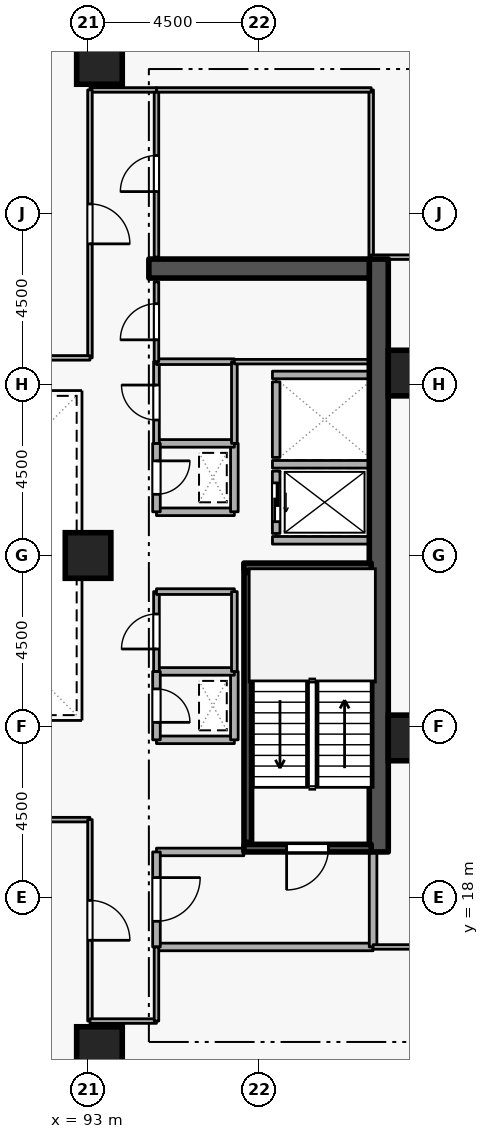
"""IFC4 building model, lengths in metres.
Left out: names, types, materials, properties, quantities, classifications, styles, units other than length and angle.
Written with IfcOpenShell. Run it as: python <this file> out.ifc"""

import sys

from ifc_helpers import new_model, si_unit, direction, frame, frame_2d, origin, origin_2d, place, context, subcontext, project, spatial, rectangle, extrude, element, fill, save


model = new_model("IFC4")
c1 = context("Model", 3, precision=1e-05, world=origin(), true_north=direction((0.0, 1.0)))
c2 = subcontext(c1, "Body", "Model", "MODEL_VIEW")
j1 = project(units=[si_unit("LENGTHUNIT", "METRE"), si_unit("PLANEANGLEUNIT", "RADIAN")], contexts=[c1])
p1 = place(None, origin())
s1 = spatial("IfcSite", under=j1, at=p1, CompositionType="ELEMENT")
p2 = place(p1, origin())
s2 = spatial("IfcBuilding", under=s1, at=p2, CompositionType="ELEMENT")
p3 = place(p2, frame((0.0, 0.0, 126.9)))
s3 = spatial("IfcBuildingStorey", under=s2, at=p3, CompositionType="ELEMENT", Elevation=126.9)
p4 = place(p3, frame((100.65, 19.2, 0.0), z_axis=(0.0, 0.0, 1.0), x_axis=(0.0, 1.0, 0.0)))
e1 = element("IfcWall", 1, at=p4, inside=s3, PredefinedType="SHEAR", context=c2, shape_type="SweptSolid", body=[
    extrude(rectangle(XDim=15.6, YDim=0.5, at=frame_2d((7.8, 0.0))), origin(), (0.0, 0.0, 1.0), 3.6),
])
p5 = place(p3, frame((94.6, 34.55, 0.0), z_axis=(0.0, 0.0, 1.0), x_axis=(1.0, 0.0, 0.0)))
e2 = element("IfcWall", 2, at=p5, inside=s3, PredefinedType="SHEAR", context=c2, shape_type="SweptSolid", body=[
    extrude(rectangle(XDim=5.8, YDim=0.5, at=frame_2d((2.9, 0.0))), origin(), (0.0, 0.0, 1.0), 3.6),
])
for number, where, z_axis, x_axis in (
    (3, (93.3, 14.0, 0.0), (0.0, 0.0, 1.0), (1.0, 0.0, 0.0)),
    (4, (93.3, 40.0, 0.0), (0.0, 0.0, 1.0), (1.0, 0.0, 0.0)),
    (5, (101.5, 22.2, 0.0), (0.0, 0.0, 1.0), (1.0, 0.0, 0.0)),
    (6, (101.5, 31.8, 0.0), (0.0, 0.0, 1.0), (1.0, 0.0, 0.0)),
    (7, (93.0, 27.0, 0.0), (0.0, 0.0, 1.0), (1.0, 0.0, 0.0)),
):
    element("IfcColumn", number, at=place(p3, frame(where, z_axis=z_axis, x_axis=x_axis)), inside=s3, PredefinedType="COLUMN", context=c2, shape_type="SweptSolid", body=[
        extrude(rectangle(XDim=1.2, YDim=1.2, at=origin_2d()), origin(), (0.0, 0.0, 1.0), 3.6),
    ])
p6 = place(p3, frame((97.95, 29.22, 0.0), z_axis=(0.0, 0.0, 1.0), x_axis=(0.0, -1.0, 0.0)))
e8 = element("IfcWall", 8, at=p6, inside=s3, PredefinedType="STANDARD", context=c2, shape_type="SweptSolid", body=[
    extrude(rectangle(XDim=1.64, YDim=0.2, at=frame_2d((0.82, 0.0))), origin(), (0.0, 0.0, 1.0), 3.34),
])
p7 = place(p6, frame((0.31, 0.0, 0.0)))
e9 = element("IfcOpeningElement", 9, at=p7, cuts=e8, PredefinedType="OPENING", context=c2, shape_type="SweptSolid", body=[
    extrude(rectangle(XDim=1.02, YDim=2.06, at=frame_2d((0.51, 1.03))), frame((0.0, 0.11, 0.0), z_axis=(0.0, -1.0, 0.0), x_axis=(1.0, 0.0, 0.0)), (0.0, 0.0, 1.0), 0.22),
])
p8 = place(p3, frame((97.95, 31.57, 0.0), z_axis=(0.0, 0.0, 1.0), x_axis=(0.0, -1.0, 0.0)))
e10 = element("IfcWall", 10, at=p8, inside=s3, PredefinedType="STANDARD", context=c2, shape_type="SweptSolid", body=[
    extrude(rectangle(XDim=1.99, YDim=0.2, at=frame_2d((0.995, 0.0))), origin(), (0.0, 0.0, 1.0), 3.34),
])
for number, where, z_axis, x_axis in (
    (11, (97.852, 29.4, 0.0), (0.0, 0.0, 1.0), (1.0, 0.0, 0.0)),
    (12, (97.852, 27.4, 0.0), (0.0, 0.0, 1.0), (1.0, 0.0, 0.0)),
    (13, (97.852, 31.75, 0.0), (0.0, 0.0, 1.0), (1.0, 0.0, 0.0)),
):
    element("IfcWall", number, at=place(p3, frame(where, z_axis=z_axis, x_axis=x_axis)), inside=s3, PredefinedType="STANDARD", context=c2, shape_type="SweptSolid", body=[
        extrude(rectangle(XDim=2.536, YDim=0.2, at=frame_2d((1.268, 0.0))), origin(), (0.0, 0.0, 1.0), 3.34),
    ])
p9 = place(p3, frame((100.45, 19.3, 0.0), z_axis=(0.0, 0.0, 1.0), x_axis=(-1.0, 0.0, 0.0)))
e14 = element("IfcWall", 14, at=p9, inside=s3, PredefinedType="SHEAR", context=c2, shape_type="SweptSolid", body=[
    extrude(rectangle(XDim=3.35, YDim=0.2, at=frame_2d((1.675, 0.0))), origin(), (0.0, 0.0, 1.0), 3.6),
])
p10 = place(p9, frame((1.125, 0.0, 0.0)))
e15 = element("IfcOpeningElement", 15, at=p10, cuts=e14, PredefinedType="OPENING", context=c2, shape_type="SweptSolid", body=[
    extrude(rectangle(XDim=1.1, YDim=2.1, at=frame_2d((0.55, 1.05))), frame((0.0, 0.11, 0.0), z_axis=(0.0, -1.0, 0.0), x_axis=(1.0, 0.0, 0.0)), (0.0, 0.0, 1.0), 0.22),
])
p11 = place(p3, frame((97.1, 26.7, 0.0), z_axis=(0.0, 0.0, 1.0), x_axis=(1.0, 0.0, 0.0)))
e16 = element("IfcWall", 16, at=p11, inside=s3, PredefinedType="SHEAR", context=c2, shape_type="SweptSolid", body=[
    extrude(rectangle(XDim=3.35, YDim=0.2, at=frame_2d((1.675, 0.0))), origin(), (0.0, 0.0, 1.0), 3.6),
])
p12 = place(p3, frame((97.203, 26.55, 0.0), z_axis=(0.0, 0.0, 1.0), x_axis=(0.0, -1.0, 0.0)))
e17 = element("IfcWall", 17, at=p12, inside=s3, PredefinedType="SHEAR", context=c2, shape_type="SweptSolid", body=[
    extrude(rectangle(XDim=7.1, YDim=0.2, at=frame_2d((3.55, 0.0))), origin(), (0.0, 0.0, 1.0), 3.6),
])
p13 = place(p3, frame((94.8, 16.7, 0.0), z_axis=(0.0, 0.0, 1.0), x_axis=(1.0, 0.0, 0.0)))
e18 = element("IfcWall", 18, at=p13, inside=s3, PredefinedType="STANDARD", context=c2, shape_type="SweptSolid", body=[
    extrude(rectangle(XDim=5.7, YDim=0.2, at=frame_2d((2.85, 0.0))), origin(), (0.0, 0.0, 1.0), 3.34),
])
p14 = place(p3, frame((100.5, 16.7, 0.0), z_axis=(0.0, 0.0, 1.0), x_axis=(0.0, 1.0, 0.0)))
e19 = element("IfcWall", 19, at=p14, inside=s3, PredefinedType="STANDARD", context=c2, shape_type="SweptSolid", body=[
    extrude(rectangle(XDim=2.5, YDim=0.2, at=frame_2d((1.25, 0.0))), origin(), (0.0, 0.0, 1.0), 3.34),
])
p15 = place(p3, frame((97.1, 19.2, 0.0), z_axis=(0.0, 0.0, 1.0), x_axis=(-1.0, 0.0, 0.0)))
e20 = element("IfcWall", 20, at=p15, inside=s3, PredefinedType="STANDARD", context=c2, shape_type="SweptSolid", body=[
    extrude(rectangle(XDim=2.3, YDim=0.2, at=frame_2d((1.15, 0.0))), origin(), (0.0, 0.0, 1.0), 2.545),
])
p16 = place(p3, frame((94.8, 19.2, 0.0), z_axis=(0.0, 0.0, 1.0), x_axis=(0.0, -1.0, 0.0)))
e21 = element("IfcWall", 21, at=p16, inside=s3, PredefinedType="STANDARD", context=c2, shape_type="SweptSolid", body=[
    extrude(rectangle(XDim=2.5, YDim=0.2, at=frame_2d((1.25, 0.0))), origin(), (0.0, 0.0, 1.0), 3.34),
])
p17 = place(p16, frame((0.675, 0.0, 0.0)))
e22 = element("IfcOpeningElement", 22, at=p17, cuts=e21, PredefinedType="OPENING", context=c2, shape_type="SweptSolid", body=[
    extrude(rectangle(XDim=1.15, YDim=2.1, at=frame_2d((0.575, 1.05))), frame((0.0, 0.11, 0.0), z_axis=(0.0, -1.0, 0.0), x_axis=(1.0, 0.0, 0.0)), (0.0, 0.0, 1.0), 0.22),
])
p18 = place(p3, frame((94.8, 28.15, 0.0), z_axis=(0.0, 0.0, 1.0), x_axis=(1.0, 0.0, 0.0)))
e23 = element("IfcWall", 23, at=p18, inside=s3, PredefinedType="STANDARD", context=c2, shape_type="SweptSolid", body=[
    extrude(rectangle(XDim=2.05, YDim=0.2, at=frame_2d((1.025, 0.0))), origin(), (0.0, 0.0, 1.0), 3.34),
])
p19 = place(p3, frame((96.85, 28.15, 0.0), z_axis=(0.0, 0.0, 1.0), x_axis=(0.0, 1.0, 0.0)))
e24 = element("IfcWall", 24, at=p19, inside=s3, PredefinedType="STANDARD", context=c2, shape_type="SweptSolid", body=[
    extrude(rectangle(XDim=1.8, YDim=0.2, at=frame_2d((0.9, 0.0))), origin(), (0.0, 0.0, 1.0), 3.34),
])
p20 = place(p3, frame((96.85, 29.95, 0.0), z_axis=(0.0, 0.0, 1.0), x_axis=(-1.0, 0.0, 0.0)))
e25 = element("IfcWall", 25, at=p20, inside=s3, PredefinedType="STANDARD", context=c2, shape_type="SweptSolid", body=[
    extrude(rectangle(XDim=2.05, YDim=0.2, at=frame_2d((1.025, 0.0))), origin(), (0.0, 0.0, 1.0), 3.34),
])
p21 = place(p3, frame((94.8, 29.95, 0.0), z_axis=(0.0, 0.0, 1.0), x_axis=(0.0, -1.0, 0.0)))
e26 = element("IfcWall", 26, at=p21, inside=s3, PredefinedType="STANDARD", context=c2, shape_type="SweptSolid", body=[
    extrude(rectangle(XDim=1.8, YDim=0.2, at=frame_2d((0.9, 0.0))), origin(), (0.0, 0.0, 1.0), 3.34),
])
p22 = place(p21, frame((0.46, 0.0, 0.0)))
e27 = element("IfcOpeningElement", 27, at=p22, cuts=e26, PredefinedType="OPENING", context=c2, shape_type="SweptSolid", body=[
    extrude(rectangle(XDim=0.88, YDim=2.04, at=frame_2d((0.44, 1.02))), frame((0.0, 0.11, 0.0), z_axis=(0.0, -1.0, 0.0), x_axis=(1.0, 0.0, 0.0)), (0.0, 0.0, 1.0), 0.22),
])
p23 = place(p3, frame((94.8, 22.15, 0.0), z_axis=(0.0, 0.0, 1.0), x_axis=(1.0, 0.0, 0.0)))
e28 = element("IfcWall", 28, at=p23, inside=s3, PredefinedType="STANDARD", context=c2, shape_type="SweptSolid", body=[
    extrude(rectangle(XDim=2.05, YDim=0.2, at=frame_2d((1.025, 0.0))), origin(), (0.0, 0.0, 1.0), 3.34),
])
p24 = place(p3, frame((96.85, 22.15, 0.0), z_axis=(0.0, 0.0, 1.0), x_axis=(0.0, 1.0, 0.0)))
e29 = element("IfcWall", 29, at=p24, inside=s3, PredefinedType="STANDARD", context=c2, shape_type="SweptSolid", body=[
    extrude(rectangle(XDim=1.8, YDim=0.2, at=frame_2d((0.9, 0.0))), origin(), (0.0, 0.0, 1.0), 3.34),
])
p25 = place(p3, frame((96.85, 23.95, 0.0), z_axis=(0.0, 0.0, 1.0), x_axis=(-1.0, 0.0, 0.0)))
e30 = element("IfcWall", 30, at=p25, inside=s3, PredefinedType="STANDARD", context=c2, shape_type="SweptSolid", body=[
    extrude(rectangle(XDim=2.05, YDim=0.2, at=frame_2d((1.025, 0.0))), origin(), (0.0, 0.0, 1.0), 3.34),
])
p26 = place(p3, frame((94.8, 23.95, 0.0), z_axis=(0.0, 0.0, 1.0), x_axis=(0.0, -1.0, 0.0)))
e31 = element("IfcWall", 31, at=p26, inside=s3, PredefinedType="STANDARD", context=c2, shape_type="SweptSolid", body=[
    extrude(rectangle(XDim=1.8, YDim=0.2, at=frame_2d((0.9, 0.0))), origin(), (0.0, 0.0, 1.0), 3.34),
])
p27 = place(p26, frame((0.46, 0.0, 0.0)))
e32 = element("IfcOpeningElement", 32, at=p27, cuts=e31, PredefinedType="OPENING", context=c2, shape_type="SweptSolid", body=[
    extrude(rectangle(XDim=0.88, YDim=2.04, at=frame_2d((0.44, 1.02))), frame((0.0, 0.11, 0.0), z_axis=(0.0, -1.0, 0.0), x_axis=(1.0, 0.0, 0.0)), (0.0, 0.0, 1.0), 0.22),
])
p28 = place(p3, frame((94.8, 23.95, 0.0), z_axis=(0.0, 0.0, 1.0), x_axis=(0.0, 1.0, 0.0)))
e33 = element("IfcWall", 33, at=p28, inside=s3, PredefinedType="PARTITIONING", context=c2, shape_type="SweptSolid", body=[
    extrude(rectangle(XDim=2.1, YDim=0.15, at=frame_2d((1.05, 0.0))), origin(), (0.0, 0.0, 1.0), 3.34),
])
p29 = place(p28, frame((0.59, 0.0, 0.0)))
e34 = element("IfcOpeningElement", 34, at=p29, cuts=e33, PredefinedType="OPENING", context=c2, shape_type="SweptSolid", body=[
    extrude(rectangle(XDim=0.92, YDim=2.08, at=frame_2d((0.46, 1.04))), frame((0.0, 0.085, 0.0), z_axis=(0.0, -1.0, 0.0), x_axis=(1.0, 0.0, 0.0)), (0.0, 0.0, 1.0), 0.17),
])
p30 = place(p3, frame((94.8, 26.05, 0.0), z_axis=(0.0, 0.0, 1.0), x_axis=(1.0, 0.0, 0.0)))
e35 = element("IfcWall", 35, at=p30, inside=s3, PredefinedType="PARTITIONING", context=c2, shape_type="SweptSolid", body=[
    extrude(rectangle(XDim=2.05, YDim=0.15, at=frame_2d((1.025, 0.0))), origin(), (0.0, 0.0, 1.0), 3.34),
])
p31 = place(p3, frame((96.85, 26.05, 0.0), z_axis=(0.0, 0.0, 1.0), x_axis=(0.0, -1.0, 0.0)))
e36 = element("IfcWall", 36, at=p31, inside=s3, PredefinedType="PARTITIONING", context=c2, shape_type="SweptSolid", body=[
    extrude(rectangle(XDim=2.1, YDim=0.15, at=frame_2d((1.05, 0.0))), origin(), (0.0, 0.0, 1.0), 3.34),
])
p32 = place(p3, frame((94.8, 29.95, 0.0), z_axis=(0.0, 0.0, 1.0), x_axis=(0.0, 1.0, 0.0)))
e37 = element("IfcWall", 37, at=p32, inside=s3, PredefinedType="PARTITIONING", context=c2, shape_type="SweptSolid", body=[
    extrude(rectangle(XDim=2.15, YDim=0.15, at=frame_2d((1.075, 0.0))), origin(), (0.0, 0.0, 1.0), 3.34),
])
p33 = place(p32, frame((0.615, 0.0, 0.0)))
e38 = element("IfcOpeningElement", 38, at=p33, cuts=e37, PredefinedType="OPENING", context=c2, shape_type="SweptSolid", body=[
    extrude(rectangle(XDim=0.92, YDim=2.08, at=frame_2d((0.46, 1.04))), frame((0.0, 0.085, 0.0), z_axis=(0.0, -1.0, 0.0), x_axis=(1.0, 0.0, 0.0)), (0.0, 0.0, 1.0), 0.17),
])
p34 = place(p3, frame((94.8, 32.1, 0.0), z_axis=(0.0, 0.0, 1.0), x_axis=(1.0, 0.0, 0.0)))
e39 = element("IfcWall", 39, at=p34, inside=s3, PredefinedType="PARTITIONING", context=c2, shape_type="SweptSolid", body=[
    extrude(rectangle(XDim=2.05, YDim=0.15, at=frame_2d((1.025, 0.0))), origin(), (0.0, 0.0, 1.0), 3.34),
])
p35 = place(p3, frame((96.85, 32.1, 0.0), z_axis=(0.0, 0.0, 1.0), x_axis=(0.0, -1.0, 0.0)))
e40 = element("IfcWall", 40, at=p35, inside=s3, PredefinedType="PARTITIONING", context=c2, shape_type="SweptSolid", body=[
    extrude(rectangle(XDim=2.15, YDim=0.15, at=frame_2d((1.075, 0.0))), origin(), (0.0, 0.0, 1.0), 3.34),
])
p36 = place(p3, frame((94.8, 32.1, 0.0), z_axis=(0.0, 0.0, 1.0), x_axis=(0.0, 1.0, 0.0)))
e41 = element("IfcWall", 41, at=p36, inside=s3, PredefinedType="PARTITIONING", context=c2, shape_type="SweptSolid", body=[
    extrude(rectangle(XDim=2.1, YDim=0.12, at=frame_2d((1.05, 0.0))), origin(), (0.0, 0.0, 1.0), 3.34),
])
p37 = place(p36, frame((0.575, 0.0, 0.0)))
e42 = element("IfcOpeningElement", 42, at=p37, cuts=e41, PredefinedType="OPENING", context=c2, shape_type="SweptSolid", body=[
    extrude(rectangle(XDim=0.95, YDim=2.1, at=frame_2d((0.475, 1.05))), frame((0.0, 0.07, 0.0), z_axis=(0.0, -1.0, 0.0), x_axis=(1.0, 0.0, 0.0)), (0.0, 0.0, 1.0), 0.14),
])
p38 = place(p3, frame((100.4, 32.1, 0.0), z_axis=(0.0, 0.0, 1.0), x_axis=(-1.0, 0.0, 0.0)))
e43 = element("IfcWall", 43, at=p38, inside=s3, PredefinedType="PARTITIONING", context=c2, shape_type="SweptSolid", body=[
    extrude(rectangle(XDim=3.55, YDim=0.12, at=frame_2d((1.775, 0.0))), origin(), (0.0, 0.0, 1.0), 3.34),
])
p39 = place(p3, frame((100.45, 39.25, 0.0), z_axis=(0.0, 0.0, 1.0), x_axis=(0.0, -1.0, 0.0)))
e44 = element("IfcWall", 44, at=p39, inside=s3, PredefinedType="PARTITIONING", context=c2, shape_type="SweptSolid", body=[
    extrude(rectangle(XDim=4.4, YDim=0.12, at=frame_2d((2.2, 0.0))), origin(), (0.0, 0.0, 1.0), 3.34),
])
p40 = place(p3, frame((94.8, 34.85, 0.0), z_axis=(0.0, 0.0, 1.0), x_axis=(0.0, 1.0, 0.0)))
e45 = element("IfcWall", 45, at=p40, inside=s3, PredefinedType="PARTITIONING", context=c2, shape_type="SweptSolid", body=[
    extrude(rectangle(XDim=4.4, YDim=0.12, at=frame_2d((2.2, 0.0))), origin(), (0.0, 0.0, 1.0), 3.34),
])
p41 = place(p40, frame((1.725, 0.0, 0.0)))
e46 = element("IfcOpeningElement", 46, at=p41, cuts=e45, PredefinedType="OPENING", context=c2, shape_type="SweptSolid", body=[
    extrude(rectangle(XDim=0.95, YDim=2.1, at=frame_2d((0.475, 1.05))), frame((0.0, 0.07, 0.0), z_axis=(0.0, -1.0, 0.0), x_axis=(1.0, 0.0, 0.0)), (0.0, 0.0, 1.0), 0.14),
])
p42 = place(p3, frame((94.8, 39.25, 0.0), z_axis=(0.0, 0.0, 1.0), x_axis=(1.0, 0.0, 0.0)))
e47 = element("IfcWall", 47, at=p42, inside=s3, PredefinedType="PARTITIONING", context=c2, shape_type="SweptSolid", body=[
    extrude(rectangle(XDim=5.65, YDim=0.12, at=frame_2d((2.825, 0.0))), origin(), (0.0, 0.0, 1.0), 3.34),
])
p43 = place(p3, frame((88.5, 20.05, 0.0), z_axis=(0.0, 0.0, 1.0), x_axis=(1.0, 0.0, 0.0)))
e48 = element("IfcWall", 48, at=p43, inside=s3, PredefinedType="PARTITIONING", context=c2, shape_type="SweptSolid", body=[
    extrude(rectangle(XDim=4.55, YDim=0.12, at=frame_2d((2.275, 0.0))), origin(), (0.0, 0.0, 1.0), 3.34),
])
p44 = place(p3, frame((93.05, 20.05, 0.0), z_axis=(0.0, 0.0, 1.0), x_axis=(0.0, -1.0, 0.0)))
e49 = element("IfcWall", 49, at=p44, inside=s3, PredefinedType="PARTITIONING", context=c2, shape_type="SweptSolid", body=[
    extrude(rectangle(XDim=5.3, YDim=0.12, at=frame_2d((2.65, 0.0))), origin(), (0.0, 0.0, 1.0), 3.34),
])
p45 = place(p44, frame((2.125, 0.0, 0.0)))
e50 = element("IfcOpeningElement", 50, at=p45, cuts=e49, PredefinedType="OPENING", context=c2, shape_type="SweptSolid", body=[
    extrude(rectangle(XDim=1.05, YDim=2.1, at=frame_2d((0.525, 1.05))), frame((0.0, 0.07, 0.0), z_axis=(0.0, -1.0, 0.0), x_axis=(1.0, 0.0, 0.0)), (0.0, 0.0, 1.0), 0.14),
])
p46 = place(p3, frame((93.05, 14.75, 0.0), z_axis=(0.0, 0.0, 1.0), x_axis=(1.0, 0.0, 0.0)))
e51 = element("IfcWall", 51, at=p46, inside=s3, PredefinedType="PARTITIONING", context=c2, shape_type="SweptSolid", body=[
    extrude(rectangle(XDim=1.75, YDim=0.12, at=frame_2d((0.875, 0.0))), origin(), (0.0, 0.0, 1.0), 3.34),
])
p47 = place(p3, frame((94.8, 14.75, 0.0), z_axis=(0.0, 0.0, 1.0), x_axis=(0.0, 1.0, 0.0)))
e52 = element("IfcWall", 52, at=p47, inside=s3, PredefinedType="PARTITIONING", context=c2, shape_type="SweptSolid", body=[
    extrude(rectangle(XDim=1.95, YDim=0.12, at=frame_2d((0.975, 0.0))), origin(), (0.0, 0.0, 1.0), 3.34),
])
p48 = place(p3, frame((100.5, 16.7, 0.0), z_axis=(0.0, 0.0, 1.0), x_axis=(1.0, 0.0, 0.0)))
e53 = element("IfcWall", 53, at=p48, inside=s3, PredefinedType="PARTITIONING", context=c2, shape_type="SweptSolid", body=[
    extrude(rectangle(XDim=11.72, YDim=0.12, at=frame_2d((5.86, 0.0))), origin(), (0.0, 0.0, 1.0), 3.34),
])
p49 = place(p3, frame((94.8, 39.25, 0.0), z_axis=(0.0, 0.0, 1.0), x_axis=(-1.0, 0.0, 0.0)))
e54 = element("IfcWall", 54, at=p49, inside=s3, PredefinedType="PARTITIONING", context=c2, shape_type="SweptSolid", body=[
    extrude(rectangle(XDim=1.75, YDim=0.12, at=frame_2d((0.875, 0.0))), origin(), (0.0, 0.0, 1.0), 3.34),
])
p50 = place(p3, frame((93.05, 39.25, 0.0), z_axis=(0.0, 0.0, 1.0), x_axis=(0.0, -1.0, 0.0)))
e55 = element("IfcWall", 55, at=p50, inside=s3, PredefinedType="PARTITIONING", context=c2, shape_type="SweptSolid", body=[
    extrude(rectangle(XDim=7.05, YDim=0.12, at=frame_2d((3.525, 0.0))), origin(), (0.0, 0.0, 1.0), 3.34),
])
p51 = place(p50, frame((3.0, 0.0, 0.0)))
e56 = element("IfcOpeningElement", 56, at=p51, cuts=e55, PredefinedType="OPENING", context=c2, shape_type="SweptSolid", body=[
    extrude(rectangle(XDim=1.05, YDim=2.1, at=frame_2d((0.525, 1.05))), frame((0.0, 0.07, 0.0), z_axis=(0.0, -1.0, 0.0), x_axis=(1.0, 0.0, 0.0)), (0.0, 0.0, 1.0), 0.14),
])
p52 = place(p3, frame((93.05, 32.2, 0.0), z_axis=(0.0, 0.0, 1.0), x_axis=(-1.0, 0.0, 0.0)))
e57 = element("IfcWall", 57, at=p52, inside=s3, PredefinedType="PARTITIONING", context=c2, shape_type="SweptSolid", body=[
    extrude(rectangle(XDim=4.55, YDim=0.12, at=frame_2d((2.275, 0.0))), origin(), (0.0, 0.0, 1.0), 3.34),
])
p53 = place(p3, frame((112.22, 34.85, 0.0), z_axis=(0.0, 0.0, 1.0), x_axis=(-1.0, 0.0, 0.0)))
e58 = element("IfcWall", 58, at=p53, inside=s3, PredefinedType="PARTITIONING", context=c2, shape_type="SweptSolid", body=[
    extrude(rectangle(XDim=11.77, YDim=0.12, at=frame_2d((5.885, 0.0))), origin(), (0.0, 0.0, 1.0), 2.545),
])
p54 = place(p7, origin())
e59 = element("IfcDoor", 59, at=p54, inside=s3, OperationType="SLIDING_TO_LEFT", PredefinedType="DOOR", context=c2, shape_type="SweptSolid", body=[
    extrude(rectangle(XDim=1.02, YDim=2.06, at=frame_2d((0.51, 1.03))), frame((0.0, 0.025, 0.0), z_axis=(0.0, -1.0, 0.0), x_axis=(1.0, 0.0, 0.0)), (0.0, 0.0, 1.0), 0.05),
])
fill(e9, e59)
p55 = place(p10, origin())
e60 = element("IfcDoor", 60, at=p55, inside=s3, OperationType="SINGLE_SWING_RIGHT", PredefinedType="DOOR", context=c2, shape_type="SweptSolid", body=[
    extrude(rectangle(XDim=1.1, YDim=2.1, at=frame_2d((0.55, 1.05))), frame((0.0, 0.025, 0.0), z_axis=(0.0, -1.0, 0.0), x_axis=(1.0, 0.0, 0.0)), (0.0, 0.0, 1.0), 0.05),
])
fill(e15, e60)
p56 = place(p17, origin())
e61 = element("IfcDoor", 61, at=p56, inside=s3, OperationType="SINGLE_SWING_LEFT", PredefinedType="DOOR", context=c2, shape_type="SweptSolid", body=[
    extrude(rectangle(XDim=1.15, YDim=2.1, at=frame_2d((0.575, 1.05))), frame((0.0, 0.025, 0.0), z_axis=(0.0, -1.0, 0.0), x_axis=(1.0, 0.0, 0.0)), (0.0, 0.0, 1.0), 0.05),
])
fill(e22, e61)
p57 = place(p22, origin())
e62 = element("IfcDoor", 62, at=p57, inside=s3, OperationType="SINGLE_SWING_LEFT", PredefinedType="DOOR", context=c2, shape_type="SweptSolid", body=[
    extrude(rectangle(XDim=0.88, YDim=2.04, at=frame_2d((0.44, 1.02))), frame((0.0, 0.025, 0.0), z_axis=(0.0, -1.0, 0.0), x_axis=(1.0, 0.0, 0.0)), (0.0, 0.0, 1.0), 0.05),
])
fill(e27, e62)
p58 = place(p27, origin())
e63 = element("IfcDoor", 63, at=p58, inside=s3, OperationType="SINGLE_SWING_RIGHT", PredefinedType="DOOR", context=c2, shape_type="SweptSolid", body=[
    extrude(rectangle(XDim=0.88, YDim=2.04, at=frame_2d((0.44, 1.02))), frame((0.0, 0.025, 0.0), z_axis=(0.0, -1.0, 0.0), x_axis=(1.0, 0.0, 0.0)), (0.0, 0.0, 1.0), 0.05),
])
fill(e32, e63)
p59 = place(p29, origin())
e64 = element("IfcDoor", 64, at=p59, inside=s3, OperationType="SINGLE_SWING_LEFT", PredefinedType="DOOR", context=c2, shape_type="SweptSolid", body=[
    extrude(rectangle(XDim=0.92, YDim=2.08, at=frame_2d((0.46, 1.04))), frame((0.0, 0.025, 0.0), z_axis=(0.0, -1.0, 0.0), x_axis=(1.0, 0.0, 0.0)), (0.0, 0.0, 1.0), 0.05),
])
fill(e34, e64)
p60 = place(p33, origin())
e65 = element("IfcDoor", 65, at=p60, inside=s3, OperationType="SINGLE_SWING_RIGHT", PredefinedType="DOOR", context=c2, shape_type="SweptSolid", body=[
    extrude(rectangle(XDim=0.92, YDim=2.08, at=frame_2d((0.46, 1.04))), frame((0.0, 0.025, 0.0), z_axis=(0.0, -1.0, 0.0), x_axis=(1.0, 0.0, 0.0)), (0.0, 0.0, 1.0), 0.05),
])
fill(e38, e65)
p61 = place(p37, origin())
e66 = element("IfcDoor", 66, at=p61, inside=s3, OperationType="SINGLE_SWING_LEFT", PredefinedType="DOOR", context=c2, shape_type="SweptSolid", body=[
    extrude(rectangle(XDim=0.95, YDim=2.1, at=frame_2d((0.475, 1.05))), frame((0.0, 0.025, 0.0), z_axis=(0.0, -1.0, 0.0), x_axis=(1.0, 0.0, 0.0)), (0.0, 0.0, 1.0), 0.05),
])
fill(e42, e66)
p62 = place(p41, origin())
e67 = element("IfcDoor", 67, at=p62, inside=s3, OperationType="SINGLE_SWING_LEFT", PredefinedType="DOOR", context=c2, shape_type="SweptSolid", body=[
    extrude(rectangle(XDim=0.95, YDim=2.1, at=frame_2d((0.475, 1.05))), frame((0.0, 0.025, 0.0), z_axis=(0.0, -1.0, 0.0), x_axis=(1.0, 0.0, 0.0)), (0.0, 0.0, 1.0), 0.05),
])
fill(e46, e67)
p63 = place(p45, origin())
e68 = element("IfcDoor", 68, at=p63, inside=s3, OperationType="SINGLE_SWING_RIGHT", PredefinedType="DOOR", context=c2, shape_type="SweptSolid", body=[
    extrude(rectangle(XDim=1.05, YDim=2.1, at=frame_2d((0.525, 1.05))), frame((0.0, 0.025, 0.0), z_axis=(0.0, -1.0, 0.0), x_axis=(1.0, 0.0, 0.0)), (0.0, 0.0, 1.0), 0.05),
])
fill(e50, e68)
p64 = place(p51, origin())
e69 = element("IfcDoor", 69, at=p64, inside=s3, OperationType="SINGLE_SWING_RIGHT", PredefinedType="DOOR", context=c2, shape_type="SweptSolid", body=[
    extrude(rectangle(XDim=1.05, YDim=2.1, at=frame_2d((0.525, 1.05))), frame((0.0, 0.025, 0.0), z_axis=(0.0, -1.0, 0.0), x_axis=(1.0, 0.0, 0.0)), (0.0, 0.0, 1.0), 0.05),
])
fill(e56, e69)
save(model, sys.argv[1])
